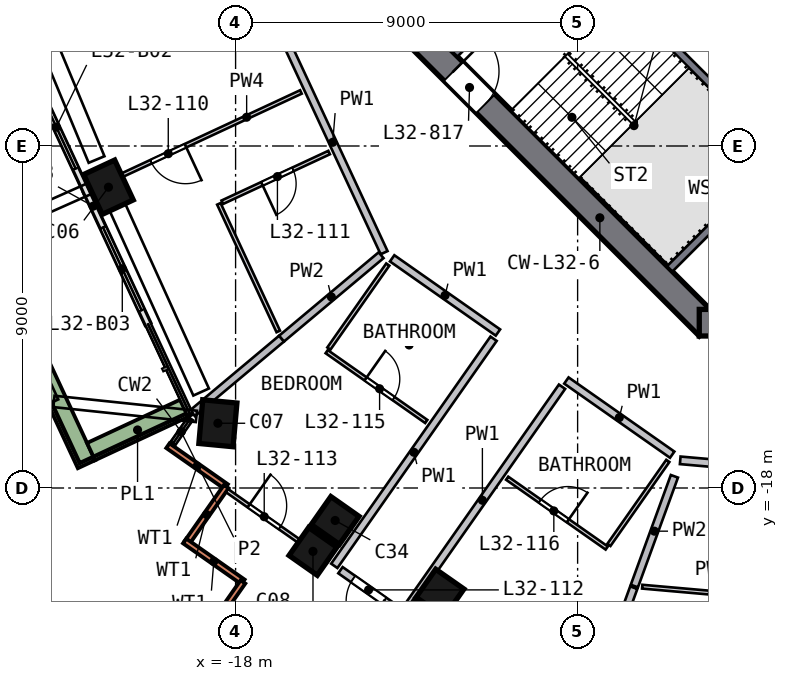
"""IFC4 building model, lengths in metres.
Left out: names, types, materials, properties, quantities, classifications, styles, units other than length and angle.
Written with IfcOpenShell. Run it as: python <this file> out.ifc"""

import sys

from ifc_helpers import new_model, si_unit, direction, frame, frame_2d, origin, origin_2d, place, context, subcontext, project, spatial, rectangle, extrude, element, fill, save


model = new_model("IFC4")
c1 = context("Model", 3, precision=1e-05, world=origin(), true_north=direction((0.0, 1.0)))
c2 = subcontext(c1, "Body", "Model", "MODEL_VIEW")
j1 = project(units=[si_unit("LENGTHUNIT", "METRE"), si_unit("PLANEANGLEUNIT", "RADIAN")], contexts=[c1])
p1 = place(None, origin())
s1 = spatial("IfcSite", under=j1, at=p1, CompositionType="ELEMENT")
p2 = place(p1, origin())
s2 = spatial("IfcBuilding", under=s1, at=p2, CompositionType="ELEMENT")
p3 = place(p2, frame((0.0, 0.0, 136.5)))
s3 = spatial("IfcBuildingStorey", under=s2, at=p3, CompositionType="ELEMENT", Elevation=136.5)
p4 = place(p3, frame((-21.403, -9.962, 0.0), z_axis=(0.048216176, -0.101375651, 0.993679112), x_axis=(0.419168471, -0.90094221, -0.112253848)))
e1 = element("IfcColumn", 1, at=p4, inside=s3, PredefinedType="COLUMN", context=c2, shape_type="SweptSolid", body=[
    extrude(rectangle(XDim=1.15, YDim=0.9, at=origin_2d()), origin(), (0.0, 0.0, 1.0), 3.21),
])
p5 = place(p3, frame((-18.56, -16.19, 0.0), z_axis=(0.077680582, -0.087561673, 0.993125712), x_axis=(0.094435426, 0.992303143, 0.080102573)))
e2 = element("IfcColumn", 2, at=p5, inside=s3, PredefinedType="COLUMN", context=c2, shape_type="SweptSolid", body=[
    extrude(rectangle(XDim=1.15, YDim=0.9, at=origin_2d()), origin(), (0.0, 0.0, 1.0), 3.212),
])
for number, where, z_axis, x_axis in (
    (3, (-15.489, -18.767, 0.0), (0.09, -0.073, 0.993), (-0.575, -0.818, -0.008)),
    (4, (-12.741, -20.694, 0.0), (0.099, -0.06, 0.993), (-0.573, -0.819, 0.008)),
):
    element("IfcColumn", number, at=place(p3, frame(where, z_axis=z_axis, x_axis=x_axis)), inside=s3, PredefinedType="COLUMN", context=c2, shape_type="SweptSolid", body=[
        extrude(rectangle(XDim=0.9, YDim=0.9, at=origin_2d()), origin(), (0.0, 0.0, 1.0), 3.211),
    ])
p6 = place(p3, frame((-16.077, -19.576, 0.0), z_axis=(0.09368082, -0.075598067, 0.992727977), x_axis=(-0.574764351, -0.818279134, -0.008074644)))
e5 = element("IfcColumn", 5, at=p6, inside=s3, PredefinedType="COLUMN", context=c2, shape_type="SweptSolid", body=[
    extrude(rectangle(XDim=0.9, YDim=0.9, at=origin_2d()), origin(), (0.0, 0.0, 1.0), 3.213),
])
p7 = place(p3, frame((-13.315, -21.513, 0.0), z_axis=(0.102724191, -0.062455093, 0.99274725), x_axis=(-0.573707052, -0.819023064, 0.007838281)))
e6 = element("IfcColumn", 6, at=p7, inside=s3, PredefinedType="COLUMN", context=c2, shape_type="SweptSolid", body=[
    extrude(rectangle(XDim=0.9, YDim=0.9, at=origin_2d()), origin(), (0.0, 0.0, 1.0), 3.213),
])
p8 = place(p3, frame((-13.752, -5.552, 0.0), z_axis=(0.0, 0.0, 1.0), x_axis=(0.707106781, -0.707106781, 0.0)))
e7 = element("IfcWall", 7, at=p8, inside=s3, PredefinedType="SHEAR", context=c2, shape_type="SweptSolid", body=[
    extrude(rectangle(XDim=11.598, YDim=0.7, at=frame_2d((5.799, 0.0))), origin(), (0.0, 0.0, 1.0), 3.5),
])
p9 = place(p8, frame((2.099, 0.0, 0.0)))
e8 = element("IfcOpeningElement", 8, at=p9, cuts=e7, PredefinedType="OPENING", context=c2, shape_type="SweptSolid", body=[
    extrude(rectangle(XDim=1.2, YDim=2.1, at=frame_2d((0.6, 1.05))), frame((0.0, 0.36, 0.0), z_axis=(0.0, -1.0, 0.0), x_axis=(1.0, 0.0, 0.0)), (0.0, 0.0, 1.0), 0.72),
])
p10 = place(p3, frame((-5.799, -13.65, 0.0), z_axis=(0.0, 0.0, 1.0), x_axis=(1.0, 0.0, 0.0)))
e9 = element("IfcWall", 9, at=p10, inside=s3, PredefinedType="SHEAR", context=c2, shape_type="SweptSolid", body=[
    extrude(rectangle(XDim=11.598, YDim=0.7, at=frame_2d((5.799, 0.0))), origin(), (0.0, 0.0, 1.0), 3.5),
])
p11 = place(p10, frame((4.899, 0.0, 0.0)))
e10 = element("IfcOpeningElement", 10, at=p11, cuts=e9, PredefinedType="OPENING", context=c2, shape_type="SweptSolid", body=[
    extrude(rectangle(XDim=1.8, YDim=2.1, at=frame_2d((0.9, 1.05))), frame((0.0, 0.36, 0.0), z_axis=(0.0, -1.0, 0.0), x_axis=(1.0, 0.0, 0.0)), (0.0, 0.0, 1.0), 0.72),
])
p12 = place(p3, frame((-19.781, -16.887, 0.0), z_axis=(0.0, 0.0, 1.0), x_axis=(0.818778979, -0.574108861, 0.0)))
e11 = element("IfcWall", 11, at=p12, inside=s3, PredefinedType="SOLIDWALL", context=c2, shape_type="SweptSolid", body=[
    extrude(rectangle(XDim=1.875, YDim=0.15, at=frame_2d((0.938, 0.0))), origin(), (0.0, 0.0, 1.0), 3.19),
])
p13 = place(p3, frame((-18.246, -17.963, 0.0), z_axis=(0.0, 0.0, 1.0), x_axis=(-0.574108441, -0.818779273, 0.0)))
e12 = element("IfcWall", 12, at=p13, inside=s3, PredefinedType="SOLIDWALL", context=c2, shape_type="SweptSolid", body=[
    extrude(rectangle(XDim=1.8, YDim=0.15, at=frame_2d((0.9, 0.0))), origin(), (0.0, 0.0, 1.0), 3.19),
])
for number, where, z_axis, x_axis in (
    (13, (-19.341, -19.394, 0.0), (0.0, 0.0, 1.0), (0.819, -0.574, 0.0)),
    (14, (-17.805, -20.471, 0.0), (0.0, 0.0, 1.0), (-0.574, -0.819, 0.0)),
):
    element("IfcWall", number, at=place(p3, frame(where, z_axis=z_axis, x_axis=x_axis)), inside=s3, PredefinedType="SOLIDWALL", context=c2, shape_type="SweptSolid", body=[
        extrude(rectangle(XDim=1.875, YDim=0.15, at=frame_2d((0.938, 0.0))), origin(), (0.0, 0.0, 1.0), 3.19),
    ])
p14 = place(p3, frame((-23.391, -7.055, 0.0), z_axis=(0.0, 0.0, 1.0), x_axis=(0.422027589, -0.906582988, 0.0)))
e15 = element("IfcWall", 15, at=p14, inside=s3, PredefinedType="SOLIDWALL", context=c2, shape_type="SweptSolid", body=[
    extrude(rectangle(XDim=3.475, YDim=0.15, at=frame_2d((1.738, 0.0))), origin(), (0.0, 0.0, 1.0), 2.475),
])
p15 = place(p14, frame((0.4, 0.0, 0.0)))
e16 = element("IfcOpeningElement", 16, at=p15, cuts=e15, PredefinedType="OPENING", context=c2, shape_type="SweptSolid", body=[
    extrude(rectangle(XDim=2.4, YDim=2.4, at=frame_2d((1.2, 1.2))), frame((0.0, 0.085, 0.0), z_axis=(0.0, -1.0, 0.0), x_axis=(1.0, 0.0, 0.0)), (0.0, 0.0, 1.0), 0.17),
])
p16 = place(p3, frame((-21.925, -10.205, 0.0), z_axis=(0.0, 0.0, 1.0), x_axis=(0.421958321, -0.90661523, 0.0)))
e17 = element("IfcWall", 17, at=p16, inside=s3, PredefinedType="SOLIDWALL", context=c2, shape_type="SweptSolid", body=[
    extrude(rectangle(XDim=3.835, YDim=0.15, at=frame_2d((1.918, 0.0))), origin(), (0.0, 0.0, 1.0), 2.475),
])
p17 = place(p16, frame((1.035, 0.0, 0.0)))
e18 = element("IfcOpeningElement", 18, at=p17, cuts=e17, PredefinedType="OPENING", context=c2, shape_type="SweptSolid", body=[
    extrude(rectangle(XDim=2.4, YDim=2.4, at=frame_2d((1.2, 1.2))), frame((0.0, 0.085, 0.0), z_axis=(0.0, -1.0, 0.0), x_axis=(1.0, 0.0, 0.0)), (0.0, 0.0, 1.0), 0.17),
])
p18 = place(p3, frame((-27.199, -6.042, 0.0), z_axis=(0.0, 0.0, 1.0), x_axis=(0.421975332, -0.906607312, 0.0)))
e19 = element("IfcWall", 19, at=p18, inside=s3, PredefinedType="SOLIDWALL", context=c2, shape_type="SweptSolid", body=[
    extrude(rectangle(XDim=12.5, YDim=0.5, at=frame_2d((6.25, 0.0))), origin(), (0.0, 0.0, 1.0), 0.7),
])
p19 = place(p3, frame((-21.803, -17.042, 0.0), z_axis=(0.0, 0.0, 1.0), x_axis=(0.906596382, 0.421998815, 0.0)))
e20 = element("IfcWall", 20, at=p19, inside=s3, PredefinedType="SOLIDWALL", context=c2, shape_type="SweptSolid", body=[
    extrude(rectangle(XDim=2.699, YDim=0.5, at=frame_2d((1.35, 0.0))), origin(), (0.0, 0.0, 1.0), 0.7),
])
p20 = place(p3, frame((-3.535, -9.334, 0.0), z_axis=(0.0, 0.0, 1.0), x_axis=(-0.707106781, 0.707106781, 0.0)))
e21 = element("IfcWall", 21, at=p20, inside=s3, PredefinedType="SOLIDWALL", context=c2, shape_type="SweptSolid", body=[
    extrude(rectangle(XDim=8.2, YDim=0.2, at=frame_2d((4.1, 0.0))), origin(), (0.0, 0.0, 1.0), 3.19),
])
p21 = place(p20, frame((6.6, 0.0, 0.0)))
e22 = element("IfcOpeningElement", 22, at=p21, cuts=e21, PredefinedType="OPENING", context=c2, shape_type="SweptSolid", body=[
    extrude(rectangle(XDim=1.2, YDim=2.1, at=frame_2d((0.6, 1.05))), frame((0.0, 0.11, 0.0), z_axis=(0.0, -1.0, 0.0), x_axis=(1.0, 0.0, 0.0)), (0.0, 0.0, 1.0), 0.22),
])
for number, where, z_axis, x_axis in (
    (23, (-9.334, -3.677, 0.0), (0.0, 0.0, 1.0), (-0.707, -0.707, 0.0)),
    (24, (-3.677, -9.334, 0.0), (0.0, 0.0, 1.0), (-0.707, -0.707, 0.0)),
):
    element("IfcWall", number, at=place(p3, frame(where, z_axis=z_axis, x_axis=x_axis)), inside=s3, PredefinedType="SOLIDWALL", context=c2, shape_type="SweptSolid", body=[
        extrude(rectangle(XDim=4.1, YDim=0.2, at=frame_2d((2.05, 0.0))), origin(), (0.0, 0.0, 1.0), 3.19),
    ])
p22 = place(p3, frame((-14.092, -11.808, 0.0), z_axis=(0.0, 0.0, 1.0), x_axis=(-0.421991127, 0.906599961, 0.0)))
e25 = element("IfcWall", 25, at=p22, inside=s3, PredefinedType="SOLIDWALL", context=c2, shape_type="SweptSolid", body=[
    extrude(rectangle(XDim=9.537, YDim=0.2, at=frame_2d((4.768, 0.0))), origin(), (0.0, 0.0, 1.0), 3.19),
])
p23 = place(p22, frame((6.608, 0.0, 0.0)))
e26 = element("IfcOpeningElement", 26, at=p23, cuts=e25, PredefinedType="OPENING", context=c2, shape_type="SweptSolid", body=[
    extrude(rectangle(XDim=1.0, YDim=2.1, at=frame_2d((0.5, 1.05))), frame((0.0, 0.11, 0.0), z_axis=(0.0, -1.0, 0.0), x_axis=(1.0, 0.0, 0.0)), (0.0, 0.0, 1.0), 0.22),
])
p24 = place(p3, frame((-13.763, -21.198, 0.0), z_axis=(0.0, 0.0, 1.0), x_axis=(-0.81872299, 0.574188702, 0.0)))
e27 = element("IfcWall", 27, at=p24, inside=s3, PredefinedType="SOLIDWALL", context=c2, shape_type="SweptSolid", body=[
    extrude(rectangle(XDim=1.804, YDim=0.2, at=frame_2d((0.902, 0.0))), origin(), (0.0, 0.0, 1.0), 3.19),
])
p25 = place(p24, frame((0.4, 0.0, 0.0)))
e28 = element("IfcOpeningElement", 28, at=p25, cuts=e27, PredefinedType="OPENING", context=c2, shape_type="SweptSolid", body=[
    extrude(rectangle(XDim=1.0, YDim=2.1, at=frame_2d((0.5, 1.05))), frame((0.0, 0.11, 0.0), z_axis=(0.0, -1.0, 0.0), x_axis=(1.0, 0.0, 0.0)), (0.0, 0.0, 1.0), 0.22),
])
p26 = place(p3, frame((-11.211, -14.072, 0.0), z_axis=(0.0, 0.0, 1.0), x_axis=(-0.57414226, -0.818755559, 0.0)))
e29 = element("IfcWall", 29, at=p26, inside=s3, PredefinedType="SOLIDWALL", context=c2, shape_type="SweptSolid", body=[
    extrude(rectangle(XDim=7.3, YDim=0.2, at=frame_2d((3.65, 0.0))), origin(), (0.0, 0.0, 1.0), 3.19),
])
p27 = place(p3, frame((-13.88, -11.956, 0.0), z_axis=(0.0, 0.0, 1.0), x_axis=(0.818762763, -0.574131987, 0.0)))
e30 = element("IfcWall", 30, at=p27, inside=s3, PredefinedType="SOLIDWALL", context=c2, shape_type="SweptSolid", body=[
    extrude(rectangle(XDim=3.4, YDim=0.2, at=frame_2d((1.7, 0.0))), origin(), (0.0, 0.0, 1.0), 3.19),
])
p28 = place(p3, frame((-13.601, -21.312, 0.0), z_axis=(0.0, 0.0, 1.0), x_axis=(0.574126539, 0.818766583, 0.0)))
e31 = element("IfcWall", 31, at=p28, inside=s3, PredefinedType="SOLIDWALL", context=c2, shape_type="SweptSolid", body=[
    extrude(rectangle(XDim=7.3, YDim=0.2, at=frame_2d((3.65, 0.0))), origin(), (0.0, 0.0, 1.0), 3.19),
])
p29 = place(p3, frame((-9.295, -15.171, 0.0), z_axis=(0.0, 0.0, 1.0), x_axis=(0.818762763, -0.574131987, 0.0)))
e32 = element("IfcWall", 32, at=p29, inside=s3, PredefinedType="SOLIDWALL", context=c2, shape_type="SweptSolid", body=[
    extrude(rectangle(XDim=3.4, YDim=0.2, at=frame_2d((1.7, 0.0))), origin(), (0.0, 0.0, 1.0), 3.19),
])
p30 = place(p3, frame((3.179, -18.108, 0.0), z_axis=(0.0, 0.0, 1.0), x_axis=(-0.996131898, 0.087870599, 0.0)))
e33 = element("IfcWall", 33, at=p30, inside=s3, PredefinedType="SOLIDWALL", context=c2, shape_type="SweptSolid", body=[
    extrude(rectangle(XDim=9.516, YDim=0.2, at=frame_2d((4.758, 0.0))), origin(), (0.0, 0.0, 1.0), 3.19),
])
p31 = place(p30, frame((5.15, 0.0, 0.0)))
e34 = element("IfcOpeningElement", 34, at=p31, cuts=e33, PredefinedType="OPENING", context=c2, shape_type="SweptSolid", body=[
    extrude(rectangle(XDim=1.0, YDim=2.1, at=frame_2d((0.5, 1.05))), frame((0.0, 0.11, 0.0), z_axis=(0.0, -1.0, 0.0), x_axis=(1.0, 0.0, 0.0)), (0.0, 0.0, 1.0), 0.22),
])
p32 = place(p3, frame((-16.79, -14.068, 0.0), z_axis=(0.0, 0.0, 1.0), x_axis=(-0.766498184, -0.642246474, 0.0)))
e35 = element("IfcWall", 35, at=p32, inside=s3, PredefinedType="SOLIDWALL", context=c2, shape_type="SweptSolid", body=[
    extrude(rectangle(XDim=3.059, YDim=0.2, at=frame_2d((1.53, 0.0))), origin(), (0.0, 0.0, 1.0), 3.19),
])
p33 = place(p3, frame((-14.171, -11.874, 0.0), z_axis=(0.0, 0.0, 1.0), x_axis=(-0.766508121, -0.642234615, 0.0)))
e36 = element("IfcWall", 36, at=p33, inside=s3, PredefinedType="SOLIDWALL", context=c2, shape_type="SweptSolid", body=[
    extrude(rectangle(XDim=3.416, YDim=0.2, at=frame_2d((1.708, 0.0))), origin(), (0.0, 0.0, 1.0), 3.19),
])
p34 = place(p3, frame((-7.523, -20.624, 0.0), z_axis=(0.0, 0.0, 1.0), x_axis=(-0.342686746, -0.93944973, 0.0)))
e37 = element("IfcWall", 37, at=p34, inside=s3, PredefinedType="SOLIDWALL", context=c2, shape_type="SweptSolid", body=[
    extrude(rectangle(XDim=3.011, YDim=0.2, at=frame_2d((1.506, 0.0))), origin(), (0.0, 0.0, 1.0), 2.69),
])
p35 = place(p3, frame((-6.453, -17.692, 0.0), z_axis=(0.0, 0.0, 1.0), x_axis=(-0.342641889, -0.939466091, 0.0)))
e38 = element("IfcWall", 38, at=p35, inside=s3, PredefinedType="SOLIDWALL", context=c2, shape_type="SweptSolid", body=[
    extrude(rectangle(XDim=3.074, YDim=0.2, at=frame_2d((1.537, 0.0))), origin(), (0.0, 0.0, 1.0), 3.19),
])
p36 = place(p3, frame((-16.281, -7.578, 0.0), z_axis=(0.0, 0.0, 1.0), x_axis=(-0.90660458, -0.421981202, 0.0)))
e39 = element("IfcWall", 39, at=p36, inside=s3, PredefinedType="PARTITIONING", context=c2, shape_type="SweptSolid", body=[
    extrude(rectangle(XDim=6.15, YDim=0.1, at=frame_2d((3.075, 0.0))), origin(), (0.0, 0.0, 1.0), 3.19),
])
p37 = place(p36, frame((3.35, 0.0, 0.0)))
e40 = element("IfcOpeningElement", 40, at=p37, cuts=e39, PredefinedType="OPENING", context=c2, shape_type="SweptSolid", body=[
    extrude(rectangle(XDim=1.0, YDim=2.1, at=frame_2d((0.5, 1.05))), frame((0.0, 0.06, 0.0), z_axis=(0.0, -1.0, 0.0), x_axis=(1.0, 0.0, 0.0)), (0.0, 0.0, 1.0), 0.12),
])
p38 = place(p3, frame((-18.44, -10.523, 0.0), z_axis=(0.0, 0.0, 1.0), x_axis=(0.421990349, -0.906600323, 0.0)))
e41 = element("IfcWall", 41, at=p38, inside=s3, PredefinedType="PARTITIONING", context=c2, shape_type="SweptSolid", body=[
    extrude(rectangle(XDim=3.704, YDim=0.1, at=frame_2d((1.852, 0.0))), origin(), (0.0, 0.0, 1.0), 3.19),
])
p39 = place(p3, frame((-15.539, -9.172, 0.0), z_axis=(0.0, 0.0, 1.0), x_axis=(-0.906613229, -0.42196262, 0.0)))
e42 = element("IfcWall", 42, at=p39, inside=s3, PredefinedType="PARTITIONING", context=c2, shape_type="SweptSolid", body=[
    extrude(rectangle(XDim=3.1, YDim=0.1, at=frame_2d((1.55, 0.0))), origin(), (0.0, 0.0, 1.0), 3.19),
])
p40 = place(p39, frame((1.05, 0.0, 0.0)))
e43 = element("IfcOpeningElement", 43, at=p40, cuts=e42, PredefinedType="OPENING", context=c2, shape_type="SweptSolid", body=[
    extrude(rectangle(XDim=0.9, YDim=2.1, at=frame_2d((0.45, 1.05))), frame((0.0, 0.06, 0.0), z_axis=(0.0, -1.0, 0.0), x_axis=(1.0, 0.0, 0.0)), (0.0, 0.0, 1.0), 0.12),
])
p41 = place(p3, frame((-18.229, -18.067, 0.0), z_axis=(0.0, 0.0, 1.0), x_axis=(0.818780202, -0.574107116, 0.0)))
e44 = element("IfcWall", 44, at=p41, inside=s3, PredefinedType="PARTITIONING", context=c2, shape_type="SweptSolid", body=[
    extrude(rectangle(XDim=3.252, YDim=0.1, at=frame_2d((1.626, 0.0))), origin(), (0.0, 0.0, 1.0), 3.19),
])
p42 = place(p41, frame((0.7, 0.0, 0.0)))
e45 = element("IfcOpeningElement", 45, at=p42, cuts=e44, PredefinedType="OPENING", context=c2, shape_type="SweptSolid", body=[
    extrude(rectangle(XDim=1.0, YDim=2.1, at=frame_2d((0.5, 1.05))), frame((0.0, 0.06, 0.0), z_axis=(0.0, -1.0, 0.0), x_axis=(1.0, 0.0, 0.0)), (0.0, 0.0, 1.0), 0.12),
])
p43 = place(p3, frame((-13.995, -12.12, 0.0), z_axis=(0.0, 0.0, 1.0), x_axis=(-0.57416, -0.818743118, 0.0)))
e46 = element("IfcWall", 46, at=p43, inside=s3, PredefinedType="PARTITIONING", context=c2, shape_type="SweptSolid", body=[
    extrude(rectangle(XDim=2.7, YDim=0.1, at=frame_2d((1.35, 0.0))), origin(), (0.0, 0.0, 1.0), 3.19),
])
p44 = place(p3, frame((-15.603, -14.412, 0.0), z_axis=(0.0, 0.0, 1.0), x_axis=(0.818744188, -0.574158475, 0.0)))
e47 = element("IfcWall", 47, at=p44, inside=s3, PredefinedType="PARTITIONING", context=c2, shape_type="SweptSolid", body=[
    extrude(rectangle(XDim=3.2, YDim=0.1, at=frame_2d((1.6, 0.0))), origin(), (0.0, 0.0, 1.0), 3.19),
])
p45 = place(p44, frame((1.25, 0.0, 0.0)))
e48 = element("IfcOpeningElement", 48, at=p45, cuts=e47, PredefinedType="OPENING", context=c2, shape_type="SweptSolid", body=[
    extrude(rectangle(XDim=0.9, YDim=2.1, at=frame_2d((0.45, 1.05))), frame((0.0, 0.06, 0.0), z_axis=(0.0, -1.0, 0.0), x_axis=(1.0, 0.0, 0.0)), (0.0, 0.0, 1.0), 0.12),
])
p46 = place(p3, frame((-10.854, -17.742, 0.0), z_axis=(0.0, 0.0, 1.0), x_axis=(0.818744188, -0.574158475, 0.0)))
e49 = element("IfcWall", 49, at=p46, inside=s3, PredefinedType="PARTITIONING", context=c2, shape_type="SweptSolid", body=[
    extrude(rectangle(XDim=3.2, YDim=0.1, at=frame_2d((1.6, 0.0))), origin(), (0.0, 0.0, 1.0), 3.19),
])
p47 = place(p46, frame((1.05, 0.0, 0.0)))
e50 = element("IfcOpeningElement", 50, at=p47, cuts=e49, PredefinedType="OPENING", context=c2, shape_type="SweptSolid", body=[
    extrude(rectangle(XDim=0.9, YDim=2.1, at=frame_2d((0.45, 1.05))), frame((0.0, 0.06, 0.0), z_axis=(0.0, -1.0, 0.0), x_axis=(1.0, 0.0, 0.0)), (0.0, 0.0, 1.0), 0.12),
])
p48 = place(p3, frame((-8.177, -19.498, 0.0), z_axis=(0.0, 0.0, 1.0), x_axis=(0.574099384, 0.818785623, 0.0)))
e51 = element("IfcWall", 51, at=p48, inside=s3, PredefinedType="PARTITIONING", context=c2, shape_type="SweptSolid", body=[
    extrude(rectangle(XDim=2.7, YDim=0.1, at=frame_2d((1.35, 0.0))), origin(), (0.0, 0.0, 1.0), 3.19),
])
p49 = place(p3, frame((-3.61, -20.922, 0.0), z_axis=(0.0, 0.0, 1.0), x_axis=(-0.996132735, 0.087861109, 0.0)))
e52 = element("IfcWall", 52, at=p49, inside=s3, PredefinedType="PARTITIONING", context=c2, shape_type="SweptSolid", body=[
    extrude(rectangle(XDim=3.704, YDim=0.1, at=frame_2d((1.852, 0.0))), origin(), (0.0, 0.0, 1.0), 3.19),
])
p50 = place(p15, origin())
e53 = element("IfcDoor", 53, at=p50, inside=s3, OperationType="SLIDING_TO_RIGHT", PredefinedType="DOOR", context=c2, shape_type="SweptSolid", body=[
    extrude(rectangle(XDim=2.4, YDim=2.4, at=frame_2d((1.2, 1.2))), frame((0.0, 0.025, 0.0), z_axis=(0.0, -1.0, 0.0), x_axis=(1.0, 0.0, 0.0)), (0.0, 0.0, 1.0), 0.05),
])
fill(e16, e53)
p51 = place(p17, origin())
e54 = element("IfcDoor", 54, at=p51, inside=s3, OperationType="SLIDING_TO_LEFT", PredefinedType="DOOR", context=c2, shape_type="SweptSolid", body=[
    extrude(rectangle(XDim=2.4, YDim=2.4, at=frame_2d((1.2, 1.2))), frame((0.0, 0.025, 0.0), z_axis=(0.0, -1.0, 0.0), x_axis=(1.0, 0.0, 0.0)), (0.0, 0.0, 1.0), 0.05),
])
fill(e18, e54)
p52 = place(p9, origin())
e55 = element("IfcDoor", 55, at=p52, inside=s3, OperationType="SINGLE_SWING_LEFT", PredefinedType="DOOR", context=c2, shape_type="SweptSolid", body=[
    extrude(rectangle(XDim=1.2, YDim=2.1, at=frame_2d((0.6, 1.05))), frame((0.0, 0.025, 0.0), z_axis=(0.0, -1.0, 0.0), x_axis=(1.0, 0.0, 0.0)), (0.0, 0.0, 1.0), 0.05),
])
fill(e8, e55)
p53 = place(p37, origin())
e56 = element("IfcDoor", 56, at=p53, inside=s3, OperationType="SINGLE_SWING_LEFT", PredefinedType="DOOR", context=c2, shape_type="SweptSolid", body=[
    extrude(rectangle(XDim=1.0, YDim=2.1, at=frame_2d((0.5, 1.05))), frame((0.0, 0.025, 0.0), z_axis=(0.0, -1.0, 0.0), x_axis=(1.0, 0.0, 0.0)), (0.0, 0.0, 1.0), 0.05),
])
fill(e40, e56)
p54 = place(p40, origin())
e57 = element("IfcDoor", 57, at=p54, inside=s3, OperationType="SINGLE_SWING_RIGHT", PredefinedType="DOOR", context=c2, shape_type="SweptSolid", body=[
    extrude(rectangle(XDim=0.9, YDim=2.1, at=frame_2d((0.45, 1.05))), frame((0.0, 0.025, 0.0), z_axis=(0.0, -1.0, 0.0), x_axis=(1.0, 0.0, 0.0)), (0.0, 0.0, 1.0), 0.05),
])
fill(e43, e57)
p55 = place(p25, origin())
e58 = element("IfcDoor", 58, at=p55, inside=s3, OperationType="SINGLE_SWING_LEFT", PredefinedType="DOOR", context=c2, shape_type="SweptSolid", body=[
    extrude(rectangle(XDim=1.0, YDim=2.1, at=frame_2d((0.5, 1.05))), frame((0.0, 0.025, 0.0), z_axis=(0.0, -1.0, 0.0), x_axis=(1.0, 0.0, 0.0)), (0.0, 0.0, 1.0), 0.05),
])
fill(e28, e58)
p56 = place(p42, origin())
e59 = element("IfcDoor", 59, at=p56, inside=s3, OperationType="SINGLE_SWING_LEFT", PredefinedType="DOOR", context=c2, shape_type="SweptSolid", body=[
    extrude(rectangle(XDim=1.0, YDim=2.1, at=frame_2d((0.5, 1.05))), frame((0.0, 0.025, 0.0), z_axis=(0.0, -1.0, 0.0), x_axis=(1.0, 0.0, 0.0)), (0.0, 0.0, 1.0), 0.05),
])
fill(e45, e59)
p57 = place(p45, origin())
e60 = element("IfcDoor", 60, at=p57, inside=s3, OperationType="SINGLE_SWING_LEFT", PredefinedType="DOOR", context=c2, shape_type="SweptSolid", body=[
    extrude(rectangle(XDim=0.9, YDim=2.1, at=frame_2d((0.45, 1.05))), frame((0.0, 0.025, 0.0), z_axis=(0.0, -1.0, 0.0), x_axis=(1.0, 0.0, 0.0)), (0.0, 0.0, 1.0), 0.05),
])
fill(e48, e60)
p58 = place(p47, origin())
e61 = element("IfcDoor", 61, at=p58, inside=s3, OperationType="SINGLE_SWING_RIGHT", PredefinedType="DOOR", context=c2, shape_type="SweptSolid", body=[
    extrude(rectangle(XDim=0.9, YDim=2.1, at=frame_2d((0.45, 1.05))), frame((0.0, 0.025, 0.0), z_axis=(0.0, -1.0, 0.0), x_axis=(1.0, 0.0, 0.0)), (0.0, 0.0, 1.0), 0.05),
])
fill(e50, e61)
save(model, sys.argv[1])
